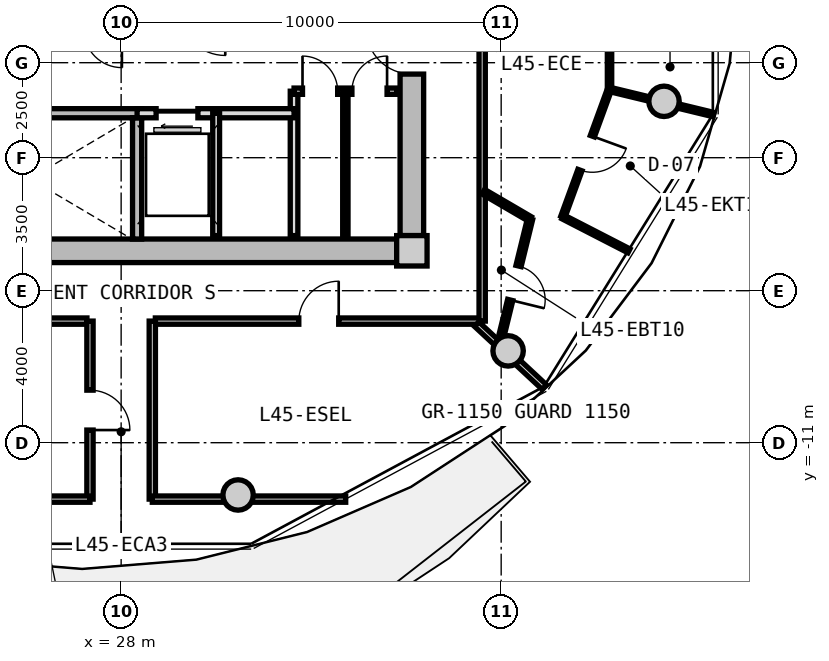
"""IFC4 building model, lengths in metres.
Left out: names, types, materials, properties, quantities, classifications, styles, units other than length and angle.
Written with IfcOpenShell. Run it as: python <this file> out.ifc"""

import sys

from ifc_helpers import new_model, si_unit, direction, frame, frame_2d, origin, origin_2d, place, context, subcontext, project, spatial, rectangle, circle, extrude, source, transform, mapped, element, fill, save


model = new_model("IFC4")
c1 = context("Model", 3, precision=1e-05, world=origin(), true_north=direction((0.0, 1.0)))
c2 = subcontext(c1, "Body", "Model", "MODEL_VIEW")
j1 = project(units=[si_unit("LENGTHUNIT", "METRE"), si_unit("PLANEANGLEUNIT", "RADIAN")], contexts=[c1])
p1 = place(None, origin())
s1 = spatial("IfcSite", under=j1, at=p1, CompositionType="ELEMENT")
p2 = place(p1, origin())
s2 = spatial("IfcBuilding", under=s1, at=p2, CompositionType="ELEMENT")
p3 = place(p2, frame((0.0, 0.0, 146.5)))
s3 = spatial("IfcBuildingStorey", under=s2, at=p3, CompositionType="ELEMENT", Elevation=146.5)
m1 = source(origin(), c2, "Body", "SweptSolid", [
    extrude(rectangle(XDim=0.8, YDim=0.8, at=origin_2d()), origin(), (0.0, 0.0, 1.0), 3.05),
])
p4 = place(p3, frame((35.65, -5.95, 0.0), z_axis=(0.0, 0.0, 1.0), x_axis=(1.0, 0.0, 0.0)))
e1 = element("IfcColumn", 1, at=p4, inside=s3, PredefinedType="COLUMN", context=c2, shape_type="MappedRepresentation", body=[
    mapped(m1, transform((0.0, 0.0, 0.0), x_axis=(1.0, 0.0, 0.0), y_axis=(0.0, 1.0, 0.0), z_axis=(0.0, 0.0, 1.0), scale=1.0)),
])
m2 = source(origin(), c2, "Body", "SweptSolid", [
    extrude(rectangle(XDim=14.5, YDim=0.62, at=frame_2d((7.25, 0.0))), origin(), (0.0, 0.0, 1.0), 2.81),
])
p5 = place(p3, frame((35.25, -5.95, 0.0), z_axis=(0.0, 0.0, 1.0), x_axis=(-1.0, 0.0, 0.0)))
e2 = element("IfcWall", 2, at=p5, inside=s3, PredefinedType="SHEAR", context=c2, shape_type="MappedRepresentation", body=[
    mapped(m2, transform((0.0, 0.0, 0.0), x_axis=(1.0, 0.0, 0.0), y_axis=(0.0, 1.0, 0.0), z_axis=(0.0, 0.0, 1.0), scale=1.0)),
])
m3 = source(origin(), c2, "Body", "SweptSolid", [
    extrude(rectangle(XDim=11.1, YDim=0.62, at=frame_2d((5.55, 0.0))), origin(), (0.0, 0.0, 1.0), 2.81),
])
p6 = place(p3, frame((35.65, 5.55, 0.0), z_axis=(0.0, 0.0, 1.0), x_axis=(0.0, -1.0, 0.0)))
e3 = element("IfcWall", 3, at=p6, inside=s3, PredefinedType="SHEAR", context=c2, shape_type="MappedRepresentation", body=[
    mapped(m3, transform((0.0, 0.0, 0.0), x_axis=(1.0, 0.0, 0.0), y_axis=(0.0, 1.0, 0.0), z_axis=(0.0, 0.0, 1.0), scale=1.0)),
])
p7 = place(p6, frame((5.65, 0.0, 0.0)))
e4 = element("IfcOpeningElement", 4, at=p7, cuts=e3, PredefinedType="OPENING", context=c2, shape_type="SweptSolid", body=[
    extrude(rectangle(XDim=1.2, YDim=2.15, at=frame_2d((0.6, 1.075))), frame((0.0, 0.32, 0.0), z_axis=(0.0, -1.0, 0.0), x_axis=(1.0, 0.0, 0.0)), (0.0, 0.0, 1.0), 0.64),
])
m4 = source(origin(), c2, "Body", "SweptSolid", [
    extrude(circle(Radius=0.4, at=origin_2d()), origin(), (0.0, 0.0, 1.0), 3.05),
])
for number, where, z_axis, x_axis in (
    (5, (31.077, -12.375, 0.0), (0.0, 0.0, 1.0), (1.0, 0.0, 0.0)),
    (6, (38.183, -8.584, 0.0), (0.0, 0.0, 1.0), (1.0, 0.0, 0.0)),
    (7, (42.285, -2.016, 0.0), (0.0, 0.0, 1.0), (1.0, 0.0, 0.0)),
):
    element("IfcColumn", number, at=place(p3, frame(where, z_axis=z_axis, x_axis=x_axis)), inside=s3, PredefinedType="COLUMN", context=c2, shape_type="MappedRepresentation", body=[
        mapped(m4, transform((0.0, 0.0, 0.0), x_axis=(1.0, 0.0, 0.0), y_axis=(0.0, 1.0, 0.0), z_axis=(0.0, 0.0, 1.0), scale=1.0)),
    ])
m5 = source(origin(), c2, "Body", "SweptSolid", [
    extrude(rectangle(XDim=7.88, YDim=0.24, at=frame_2d((3.94, 0.0))), origin(), (0.0, 0.0, 1.0), 2.81),
])
p8 = place(p3, frame((20.66, -2.33, 0.0), z_axis=(0.0, 0.0, 1.0), x_axis=(1.0, 0.0, 0.0)))
e8 = element("IfcWall", 8, at=p8, inside=s3, PredefinedType="PARTITIONING", context=c2, shape_type="MappedRepresentation", body=[
    mapped(m5, transform((0.0, 0.0, 0.0), x_axis=(1.0, 0.0, 0.0), y_axis=(0.0, 1.0, 0.0), z_axis=(0.0, 0.0, 1.0), scale=1.0)),
])
p9 = place(p8, frame((1.0, 0.0, 0.0)))
e9 = element("IfcOpeningElement", 9, at=p9, cuts=e8, PredefinedType="OPENING", context=c2, shape_type="SweptSolid", body=[
    extrude(rectangle(XDim=1.1, YDim=2.15, at=frame_2d((0.55, 1.075))), frame((0.0, 0.13, 0.0), z_axis=(0.0, -1.0, 0.0), x_axis=(1.0, 0.0, 0.0)), (0.0, 0.0, 1.0), 0.26),
])
m6 = source(origin(), c2, "Body", "SweptSolid", [
    extrude(rectangle(XDim=3.19, YDim=0.24, at=frame_2d((1.595, 0.0))), origin(), (0.0, 0.0, 1.0), 2.81),
])
p10 = place(p3, frame((28.42, -5.64, 0.0), z_axis=(0.0, 0.0, 1.0), x_axis=(0.0, 1.0, 0.0)))
e10 = element("IfcWall", 10, at=p10, inside=s3, PredefinedType="PARTITIONING", context=c2, shape_type="MappedRepresentation", body=[
    mapped(m6, transform((0.0, 0.0, 0.0), x_axis=(1.0, 0.0, 0.0), y_axis=(0.0, 1.0, 0.0), z_axis=(0.0, 0.0, 1.0), scale=1.0)),
])
m7 = source(origin(), c2, "Body", "SweptSolid", [
    extrude(rectangle(XDim=3.8, YDim=0.2, at=frame_2d((1.9, 0.0))), origin(), (0.0, 0.0, 1.0), 2.795),
])
p11 = place(p3, frame((32.55, -5.55, 0.0), z_axis=(0.0, 0.0, 1.0), x_axis=(0.0, 1.0, 0.0)))
e11 = element("IfcWall", 11, at=p11, inside=s3, PredefinedType="PARTITIONING", context=c2, shape_type="MappedRepresentation", body=[
    mapped(m7, transform((0.0, 0.0, 0.0), x_axis=(1.0, 0.0, 0.0), y_axis=(0.0, 1.0, 0.0), z_axis=(0.0, 0.0, 1.0), scale=1.0)),
])
m8 = source(origin(), c2, "Body", "SweptSolid", [
    extrude(rectangle(XDim=4.13, YDim=0.24, at=frame_2d((2.065, 0.0))), origin(), (0.0, 0.0, 1.0), 2.795),
])
p12 = place(p3, frame((28.42, -2.33, 0.0), z_axis=(0.0, 0.0, 1.0), x_axis=(1.0, 0.0, 0.0)))
e12 = element("IfcWall", 12, at=p12, inside=s3, PredefinedType="PARTITIONING", context=c2, shape_type="MappedRepresentation", body=[
    mapped(m8, transform((0.0, 0.0, 0.0), x_axis=(1.0, 0.0, 0.0), y_axis=(0.0, 1.0, 0.0), z_axis=(0.0, 0.0, 1.0), scale=1.0)),
])
p13 = place(p12, frame((0.5, 0.0, 0.0)))
e13 = element("IfcOpeningElement", 13, at=p13, cuts=e12, PredefinedType="OPENING", context=c2, shape_type="SweptSolid", body=[
    extrude(rectangle(XDim=1.1, YDim=2.2, at=frame_2d((0.55, 1.1))), frame((0.0, 0.13, 0.0), z_axis=(0.0, -1.0, 0.0), x_axis=(1.0, 0.0, 0.0)), (0.0, 0.0, 1.0), 0.26),
])
m9 = source(origin(), c2, "Body", "SweptSolid", [
    extrude(rectangle(XDim=3.22, YDim=0.18, at=frame_2d((1.61, 0.0))), origin(), (0.0, 0.0, 1.0), 2.795),
])
p14 = place(p3, frame((30.5, -5.55, 0.0), z_axis=(0.0, 0.0, 1.0), x_axis=(0.0, 1.0, 0.0)))
e14 = element("IfcWall", 14, at=p14, inside=s3, PredefinedType="PARTITIONING", context=c2, shape_type="MappedRepresentation", body=[
    mapped(m9, transform((0.0, 0.0, 0.0), x_axis=(1.0, 0.0, 0.0), y_axis=(0.0, 1.0, 0.0), z_axis=(0.0, 0.0, 1.0), scale=1.0)),
])
m10 = source(origin(), c2, "Body", "SweptSolid", [
    extrude(rectangle(XDim=2.7, YDim=0.165, at=frame_2d((1.35, 0.0))), origin(), (0.0, 0.0, 1.0), 2.795),
])
p15 = place(p3, frame((32.55, -1.75, 0.0), z_axis=(0.0, 0.0, 1.0), x_axis=(1.0, 0.0, 0.0)))
e15 = element("IfcWall", 15, at=p15, inside=s3, PredefinedType="PARTITIONING", context=c2, shape_type="MappedRepresentation", body=[
    mapped(m10, transform((0.0, 0.0, 0.0), x_axis=(1.0, 0.0, 0.0), y_axis=(0.0, 1.0, 0.0), z_axis=(0.0, 0.0, 1.0), scale=1.0)),
])
p16 = place(p15, frame((0.222, 0.0, 0.0)))
e16 = element("IfcOpeningElement", 16, at=p16, cuts=e15, PredefinedType="OPENING", context=c2, shape_type="SweptSolid", body=[
    extrude(rectangle(XDim=0.925, YDim=2.1, at=frame_2d((0.462, 1.05))), frame((0.0, 0.093, 0.0), z_axis=(0.0, -1.0, 0.0), x_axis=(1.0, 0.0, 0.0)), (0.0, 0.0, 1.0), 0.185),
])
p17 = place(p15, frame((1.522, 0.0, 0.0)))
e17 = element("IfcOpeningElement", 17, at=p17, cuts=e15, PredefinedType="OPENING", context=c2, shape_type="SweptSolid", body=[
    extrude(rectangle(XDim=0.925, YDim=2.1, at=frame_2d((0.462, 1.05))), frame((0.0, 0.093, 0.0), z_axis=(0.0, -1.0, 0.0), x_axis=(1.0, 0.0, 0.0)), (0.0, 0.0, 1.0), 0.185),
])
m11 = source(origin(), c2, "Body", "SweptSolid", [
    extrude(rectangle(XDim=3.8, YDim=0.14, at=frame_2d((1.9, 0.0))), origin(), (0.0, 0.0, 1.0), 2.795),
])
p18 = place(p3, frame((33.9, -5.55, 0.0), z_axis=(0.0, 0.0, 1.0), x_axis=(0.0, 1.0, 0.0)))
e18 = element("IfcWall", 18, at=p18, inside=s3, PredefinedType="PARTITIONING", context=c2, shape_type="MappedRepresentation", body=[
    mapped(m11, transform((0.0, 0.0, 0.0), x_axis=(1.0, 0.0, 0.0), y_axis=(0.0, 1.0, 0.0), z_axis=(0.0, 0.0, 1.0), scale=1.0)),
])
m12 = source(origin(), c2, "Body", "SweptSolid", [
    extrude(rectangle(XDim=8.6, YDim=0.165, at=frame_2d((4.3, 0.0))), origin(), (0.0, 0.0, 1.0), 2.795),
])
p19 = place(p3, frame((37.5, -7.8, 0.0), z_axis=(0.0, 0.0, 1.0), x_axis=(-1.0, 0.0, 0.0)))
e19 = element("IfcWall", 19, at=p19, inside=s3, PredefinedType="PARTITIONING", context=c2, shape_type="MappedRepresentation", body=[
    mapped(m12, transform((0.0, 0.0, 0.0), x_axis=(1.0, 0.0, 0.0), y_axis=(0.0, 1.0, 0.0), z_axis=(0.0, 0.0, 1.0), scale=1.0)),
])
p20 = place(p19, frame((3.775, 0.0, 0.0)))
e20 = element("IfcOpeningElement", 20, at=p20, cuts=e19, PredefinedType="OPENING", context=c2, shape_type="SweptSolid", body=[
    extrude(rectangle(XDim=1.05, YDim=2.15, at=frame_2d((0.525, 1.075))), frame((0.0, 0.093, 0.0), z_axis=(0.0, -1.0, 0.0), x_axis=(1.0, 0.0, 0.0)), (0.0, 0.0, 1.0), 0.185),
])
p21 = place(p3, frame((27.1, -7.8, 0.0), z_axis=(0.0, 0.0, 1.0), x_axis=(-1.0, 0.0, 0.0)))
e21 = element("IfcWall", 21, at=p21, inside=s3, PredefinedType="PARTITIONING", context=c2, shape_type="MappedRepresentation", body=[
    mapped(m12, transform((0.0, 0.0, 0.0), x_axis=(1.0, 0.0, 0.0), y_axis=(0.0, 1.0, 0.0), z_axis=(0.0, 0.0, 1.0), scale=1.0)),
])
m13 = source(origin(), c2, "Body", "SweptSolid", [
    extrude(rectangle(XDim=15.6, YDim=0.165, at=frame_2d((7.8, 0.0))), origin(), (0.0, 0.0, 1.0), 2.795),
])
p22 = place(p3, frame((37.5, 7.8, 0.0), z_axis=(0.0, 0.0, 1.0), x_axis=(0.0, -1.0, 0.0)))
e22 = element("IfcWall", 22, at=p22, inside=s3, PredefinedType="PARTITIONING", context=c2, shape_type="MappedRepresentation", body=[
    mapped(m13, transform((0.0, 0.0, 0.0), x_axis=(1.0, 0.0, 0.0), y_axis=(0.0, 1.0, 0.0), z_axis=(0.0, 0.0, 1.0), scale=1.0)),
])
p23 = place(p22, frame((5.687, 0.0, 0.0)))
e23 = element("IfcOpeningElement", 23, at=p23, cuts=e22, PredefinedType="OPENING", context=c2, shape_type="SweptSolid", body=[
    extrude(rectangle(XDim=1.05, YDim=2.15, at=frame_2d((0.525, 1.075))), frame((0.0, 0.093, 0.0), z_axis=(0.0, -1.0, 0.0), x_axis=(1.0, 0.0, 0.0)), (0.0, 0.0, 1.0), 0.185),
])
m14 = source(origin(), c2, "Body", "SweptSolid", [
    extrude(rectangle(XDim=2.435, YDim=0.165, at=frame_2d((1.217, 0.0))), origin(), (0.0, 0.0, 1.0), 2.345),
])
p24 = place(p3, frame((37.354, -7.88, 0.0), z_axis=(0.0, 0.0, 1.0), x_axis=(0.732164643118, -0.681127693878, 0.0)))
e24 = element("IfcWall", 24, at=p24, inside=s3, PredefinedType="PARTITIONING", context=c2, shape_type="MappedRepresentation", body=[
    mapped(m14, transform((0.0, 0.0, 0.0), x_axis=(1.0, 0.0, 0.0), y_axis=(0.0, 1.0, 0.0), z_axis=(0.0, 0.0, 1.0), scale=1.0)),
])
m15 = source(origin(), c2, "Body", "SweptSolid", [
    extrude(rectangle(XDim=4.685, YDim=0.165, at=frame_2d((2.342, 0.0))), origin(), (0.0, 0.0, 1.0), 2.795),
])
p25 = place(p3, frame((27.18, -12.485, 0.0), z_axis=(0.0, 0.0, 1.0), x_axis=(0.0, 1.0, 0.0)))
e25 = element("IfcWall", 25, at=p25, inside=s3, PredefinedType="PARTITIONING", context=c2, shape_type="MappedRepresentation", body=[
    mapped(m15, transform((0.0, 0.0, 0.0), x_axis=(1.0, 0.0, 0.0), y_axis=(0.0, 1.0, 0.0), z_axis=(0.0, 0.0, 1.0), scale=1.0)),
])
p26 = place(p25, frame((1.817, 0.0, 0.0)))
e26 = element("IfcOpeningElement", 26, at=p26, cuts=e25, PredefinedType="OPENING", context=c2, shape_type="SweptSolid", body=[
    extrude(rectangle(XDim=1.05, YDim=2.15, at=frame_2d((0.525, 1.075))), frame((0.0, 0.093, 0.0), z_axis=(0.0, -1.0, 0.0), x_axis=(1.0, 0.0, 0.0)), (0.0, 0.0, 1.0), 0.185),
])
m16 = source(origin(), c2, "Body", "SweptSolid", [
    extrude(rectangle(XDim=4.469, YDim=0.165, at=frame_2d((2.234, 0.0))), origin(), (0.0, 0.0, 1.0), 2.345),
])
p27 = place(p3, frame((22.711, -12.485, 0.0), z_axis=(0.0, 0.0, 1.0), x_axis=(1.0, 0.0, 0.0)))
e27 = element("IfcWall", 27, at=p27, inside=s3, PredefinedType="PARTITIONING", context=c2, shape_type="MappedRepresentation", body=[
    mapped(m16, transform((0.0, 0.0, 0.0), x_axis=(1.0, 0.0, 0.0), y_axis=(0.0, 1.0, 0.0), z_axis=(0.0, 0.0, 1.0), scale=1.0)),
])
p28 = place(p3, frame((28.82, -12.485, 0.0), z_axis=(0.0, 0.0, 1.0), x_axis=(0.0, 1.0, 0.0)))
e28 = element("IfcWall", 28, at=p28, inside=s3, PredefinedType="PARTITIONING", context=c2, shape_type="MappedRepresentation", body=[
    mapped(m15, transform((0.0, 0.0, 0.0), x_axis=(1.0, 0.0, 0.0), y_axis=(0.0, 1.0, 0.0), z_axis=(0.0, 0.0, 1.0), scale=1.0)),
])
m17 = source(origin(), c2, "Body", "SweptSolid", [
    extrude(rectangle(XDim=5.089, YDim=0.165, at=frame_2d((2.544, 0.0))), origin(), (0.0, 0.0, 1.0), 2.345),
])
p29 = place(p3, frame((28.82, -12.485, 0.0), z_axis=(0.0, 0.0, 1.0), x_axis=(1.0, 0.0, 0.0)))
e29 = element("IfcWall", 29, at=p29, inside=s3, PredefinedType="PARTITIONING", context=c2, shape_type="MappedRepresentation", body=[
    mapped(m17, transform((0.0, 0.0, 0.0), x_axis=(1.0, 0.0, 0.0), y_axis=(0.0, 1.0, 0.0), z_axis=(0.0, 0.0, 1.0), scale=1.0)),
])
m18 = source(origin(), c2, "Body", "SweptSolid", [
    extrude(rectangle(XDim=6.958, YDim=0.115, at=frame_2d((3.479, 0.0))), origin(), (0.0, 0.0, 1.0), 2.795),
])
p30 = place(p3, frame((40.851, -1.703, 0.0), z_axis=(0.0, 0.0, 1.0), x_axis=(0.0, 1.0, 0.0)))
e30 = element("IfcWall", 30, at=p30, inside=s3, PredefinedType="PARTITIONING", context=c2, shape_type="MappedRepresentation", body=[
    mapped(m18, transform((0.0, 0.0, 0.0), x_axis=(1.0, 0.0, 0.0), y_axis=(0.0, 1.0, 0.0), z_axis=(0.0, 0.0, 1.0), scale=1.0)),
])
p31 = place(p30, frame((3.004, 0.0, 0.0)))
e31 = element("IfcOpeningElement", 31, at=p31, cuts=e30, PredefinedType="OPENING", context=c2, shape_type="SweptSolid", body=[
    extrude(rectangle(XDim=0.95, YDim=2.1, at=frame_2d((0.475, 1.05))), frame((0.0, 0.067, 0.0), z_axis=(0.0, -1.0, 0.0), x_axis=(1.0, 0.0, 0.0)), (0.0, 0.0, 1.0), 0.135),
])
m19 = source(origin(), c2, "Body", "SweptSolid", [
    extrude(rectangle(XDim=2.817, YDim=0.115, at=frame_2d((1.408, 0.0))), origin(), (0.0, 0.0, 1.0), 2.345),
])
p32 = place(p3, frame((40.851, -1.703, 0.0), z_axis=(0.0, 0.0, 1.0), x_axis=(0.971960052091, -0.235146033647, 0.0)))
e32 = element("IfcWall", 32, at=p32, inside=s3, PredefinedType="PARTITIONING", context=c2, shape_type="MappedRepresentation", body=[
    mapped(m19, transform((0.0, 0.0, 0.0), x_axis=(1.0, 0.0, 0.0), y_axis=(0.0, 1.0, 0.0), z_axis=(0.0, 0.0, 1.0), scale=1.0)),
])
m20 = source(origin(), c2, "Body", "SweptSolid", [
    extrude(rectangle(XDim=1.425, YDim=0.14, at=frame_2d((0.712, 0.0))), origin(), (0.0, 0.0, 1.0), 2.795),
])
p33 = place(p3, frame((37.53, -4.396, 0.0), z_axis=(0.0, 0.0, 1.0), x_axis=(0.86324395577, -0.50478695786, 0.0)))
e33 = element("IfcWall", 33, at=p33, inside=s3, PredefinedType="PARTITIONING", context=c2, shape_type="MappedRepresentation", body=[
    mapped(m20, transform((0.0, 0.0, 0.0), x_axis=(1.0, 0.0, 0.0), y_axis=(0.0, 1.0, 0.0), z_axis=(0.0, 0.0, 1.0), scale=1.0)),
])
m21 = source(origin(), c2, "Body", "SweptSolid", [
    extrude(rectangle(XDim=3.464, YDim=0.14, at=frame_2d((1.732, 0.0))), origin(), (0.0, 0.0, 1.0), 2.795),
])
p34 = place(p3, frame((38.76, -5.115, 0.0), z_axis=(0.0, 0.0, 1.0), x_axis=(-0.238055968485, -0.971251438027, 0.0)))
e34 = element("IfcWall", 34, at=p34, inside=s3, PredefinedType="PARTITIONING", context=c2, shape_type="MappedRepresentation", body=[
    mapped(m21, transform((0.0, 0.0, 0.0), x_axis=(1.0, 0.0, 0.0), y_axis=(0.0, 1.0, 0.0), z_axis=(0.0, 0.0, 1.0), scale=1.0)),
])
p35 = place(p34, frame((1.272, 0.0, 0.0)))
e35 = element("IfcOpeningElement", 35, at=p35, cuts=e34, PredefinedType="OPENING", context=c2, shape_type="SweptSolid", body=[
    extrude(rectangle(XDim=0.92, YDim=2.1, at=frame_2d((0.46, 1.05))), frame((0.0, 0.08, 0.0), z_axis=(0.0, -1.0, 0.0), x_axis=(1.0, 0.0, 0.0)), (0.0, 0.0, 1.0), 0.16),
])
m22 = source(origin(), c2, "Body", "SweptSolid", [
    extrude(rectangle(XDim=1.957, YDim=0.115, at=frame_2d((0.979, 0.0))), origin(), (0.0, 0.0, 1.0), 2.795),
])
p36 = place(p3, frame((39.623, -5.057, 0.0), z_axis=(0.0, 0.0, 1.0), x_axis=(0.889228358674, -0.45746357902, 0.0)))
e36 = element("IfcWall", 36, at=p36, inside=s3, PredefinedType="PARTITIONING", context=c2, shape_type="MappedRepresentation", body=[
    mapped(m22, transform((0.0, 0.0, 0.0), x_axis=(1.0, 0.0, 0.0), y_axis=(0.0, 1.0, 0.0), z_axis=(0.0, 0.0, 1.0), scale=1.0)),
])
m23 = source(origin(), c2, "Body", "SweptSolid", [
    extrude(rectangle(XDim=3.571, YDim=0.115, at=frame_2d((1.786, 0.0))), origin(), (0.0, 0.0, 1.0), 2.795),
])
p37 = place(p3, frame((39.623, -5.057, 0.0), z_axis=(0.0, 0.0, 1.0), x_axis=(0.343515356993, 0.939147059576, 0.0)))
e37 = element("IfcWall", 37, at=p37, inside=s3, PredefinedType="PARTITIONING", context=c2, shape_type="MappedRepresentation", body=[
    mapped(m23, transform((0.0, 0.0, 0.0), x_axis=(1.0, 0.0, 0.0), y_axis=(0.0, 1.0, 0.0), z_axis=(0.0, 0.0, 1.0), scale=1.0)),
])
p38 = place(p37, frame((1.311, 0.0, 0.0)))
e38 = element("IfcOpeningElement", 38, at=p38, cuts=e37, PredefinedType="OPENING", context=c2, shape_type="SweptSolid", body=[
    extrude(rectangle(XDim=0.95, YDim=2.1, at=frame_2d((0.475, 1.05))), frame((0.0, 0.067, 0.0), z_axis=(0.0, -1.0, 0.0), x_axis=(1.0, 0.0, 0.0)), (0.0, 0.0, 1.0), 0.135),
])
m24 = source(origin(), c2, "Body", "SweptSolid", [
    extrude(rectangle(XDim=1.2, YDim=2.15, at=frame_2d((0.6, 1.075))), frame((0.0, 0.025, 0.0), z_axis=(0.0, -1.0, 0.0), x_axis=(1.0, 0.0, 0.0)), (0.0, 0.0, 1.0), 0.05),
])
p39 = place(p7, frame((1.2, 0.0, 0.0), z_axis=(0.0, 0.0, 1.0), x_axis=(-1.0, 0.0, 0.0)))
e39 = element("IfcDoor", 39, at=p39, inside=s3, OperationType="SINGLE_SWING_RIGHT", PredefinedType="DOOR", context=c2, shape_type="MappedRepresentation", body=[
    mapped(m24, transform((0.0, 0.0, 0.0), x_axis=(1.0, 0.0, 0.0), y_axis=(0.0, 1.0, 0.0), z_axis=(0.0, 0.0, 1.0), scale=1.0)),
])
fill(e4, e39)
m25 = source(origin(), c2, "Body", "SweptSolid", [
    extrude(rectangle(XDim=1.1, YDim=2.2, at=frame_2d((0.55, 1.1))), frame((0.0, 0.025, 0.0), z_axis=(0.0, -1.0, 0.0), x_axis=(1.0, 0.0, 0.0)), (0.0, 0.0, 1.0), 0.05),
])
p40 = place(p13, frame((1.1, 0.0, 0.0), z_axis=(0.0, 0.0, 1.0), x_axis=(-1.0, 0.0, 0.0)))
e40 = element("IfcDoor", 40, at=p40, inside=s3, OperationType="SLIDING_TO_LEFT", PredefinedType="DOOR", context=c2, shape_type="MappedRepresentation", body=[
    mapped(m25, transform((0.0, 0.0, 0.0), x_axis=(1.0, 0.0, 0.0), y_axis=(0.0, 1.0, 0.0), z_axis=(0.0, 0.0, 1.0), scale=1.0)),
])
fill(e13, e40)
m26 = source(origin(), c2, "Body", "SweptSolid", [
    extrude(rectangle(XDim=0.925, YDim=2.1, at=frame_2d((0.462, 1.05))), frame((0.0, 0.025, 0.0), z_axis=(0.0, -1.0, 0.0), x_axis=(1.0, 0.0, 0.0)), (0.0, 0.0, 1.0), 0.05),
])
p41 = place(p16, origin())
e41 = element("IfcDoor", 41, at=p41, inside=s3, OperationType="SINGLE_SWING_LEFT", PredefinedType="DOOR", context=c2, shape_type="MappedRepresentation", body=[
    mapped(m26, transform((0.0, 0.0, 0.0), x_axis=(1.0, 0.0, 0.0), y_axis=(0.0, 1.0, 0.0), z_axis=(0.0, 0.0, 1.0), scale=1.0)),
])
fill(e16, e41)
p42 = place(p17, origin())
e42 = element("IfcDoor", 42, at=p42, inside=s3, OperationType="SINGLE_SWING_RIGHT", PredefinedType="DOOR", context=c2, shape_type="MappedRepresentation", body=[
    mapped(m26, transform((0.0, 0.0, 0.0), x_axis=(1.0, 0.0, 0.0), y_axis=(0.0, 1.0, 0.0), z_axis=(0.0, 0.0, 1.0), scale=1.0)),
])
fill(e17, e42)
m27 = source(origin(), c2, "Body", "SweptSolid", [
    extrude(rectangle(XDim=1.05, YDim=2.15, at=frame_2d((0.525, 1.075))), frame((0.0, 0.025, 0.0), z_axis=(0.0, -1.0, 0.0), x_axis=(1.0, 0.0, 0.0)), (0.0, 0.0, 1.0), 0.05),
])
p43 = place(p26, frame((1.05, 0.0, 0.0), z_axis=(0.0, 0.0, 1.0), x_axis=(-1.0, 0.0, 0.0)))
e43 = element("IfcDoor", 43, at=p43, inside=s3, OperationType="SINGLE_SWING_RIGHT", PredefinedType="DOOR", context=c2, shape_type="MappedRepresentation", body=[
    mapped(m27, transform((0.0, 0.0, 0.0), x_axis=(1.0, 0.0, 0.0), y_axis=(0.0, 1.0, 0.0), z_axis=(0.0, 0.0, 1.0), scale=1.0)),
])
fill(e26, e43)
p44 = place(p20, frame((1.05, 0.0, 0.0), z_axis=(0.0, 0.0, 1.0), x_axis=(-1.0, 0.0, 0.0)))
e44 = element("IfcDoor", 44, at=p44, inside=s3, OperationType="SINGLE_SWING_RIGHT", PredefinedType="DOOR", context=c2, shape_type="MappedRepresentation", body=[
    mapped(m27, transform((0.0, 0.0, 0.0), x_axis=(1.0, 0.0, 0.0), y_axis=(0.0, 1.0, 0.0), z_axis=(0.0, 0.0, 1.0), scale=1.0)),
])
fill(e20, e44)
m28 = source(origin(), c2, "Body", "SweptSolid", [
    extrude(rectangle(XDim=0.92, YDim=2.1, at=frame_2d((0.46, 1.05))), frame((0.0, 0.025, 0.0), z_axis=(0.0, -1.0, 0.0), x_axis=(1.0, 0.0, 0.0)), (0.0, 0.0, 1.0), 0.05),
])
p45 = place(p35, origin())
e45 = element("IfcDoor", 45, at=p45, inside=s3, OperationType="SINGLE_SWING_RIGHT", PredefinedType="DOOR", context=c2, shape_type="MappedRepresentation", body=[
    mapped(m28, transform((0.0, 0.0, 0.0), x_axis=(1.0, 0.0, 0.0), y_axis=(0.0, 1.0, 0.0), z_axis=(0.0, 0.0, 1.0), scale=1.0)),
])
fill(e35, e45)
m29 = source(origin(), c2, "Body", "SweptSolid", [
    extrude(rectangle(XDim=0.95, YDim=2.1, at=frame_2d((0.475, 1.05))), frame((0.0, 0.025, 0.0), z_axis=(0.0, -1.0, 0.0), x_axis=(1.0, 0.0, 0.0)), (0.0, 0.0, 1.0), 0.05),
])
p46 = place(p38, frame((0.95, 0.0, 0.0), z_axis=(0.0, 0.0, 1.0), x_axis=(-1.0, 0.0, 0.0)))
e46 = element("IfcDoor", 46, at=p46, inside=s3, OperationType="SINGLE_SWING_LEFT", PredefinedType="DOOR", context=c2, shape_type="MappedRepresentation", body=[
    mapped(m29, transform((0.0, 0.0, 0.0), x_axis=(1.0, 0.0, 0.0), y_axis=(0.0, 1.0, 0.0), z_axis=(0.0, 0.0, 1.0), scale=1.0)),
])
fill(e38, e46)
save(model, sys.argv[1])
